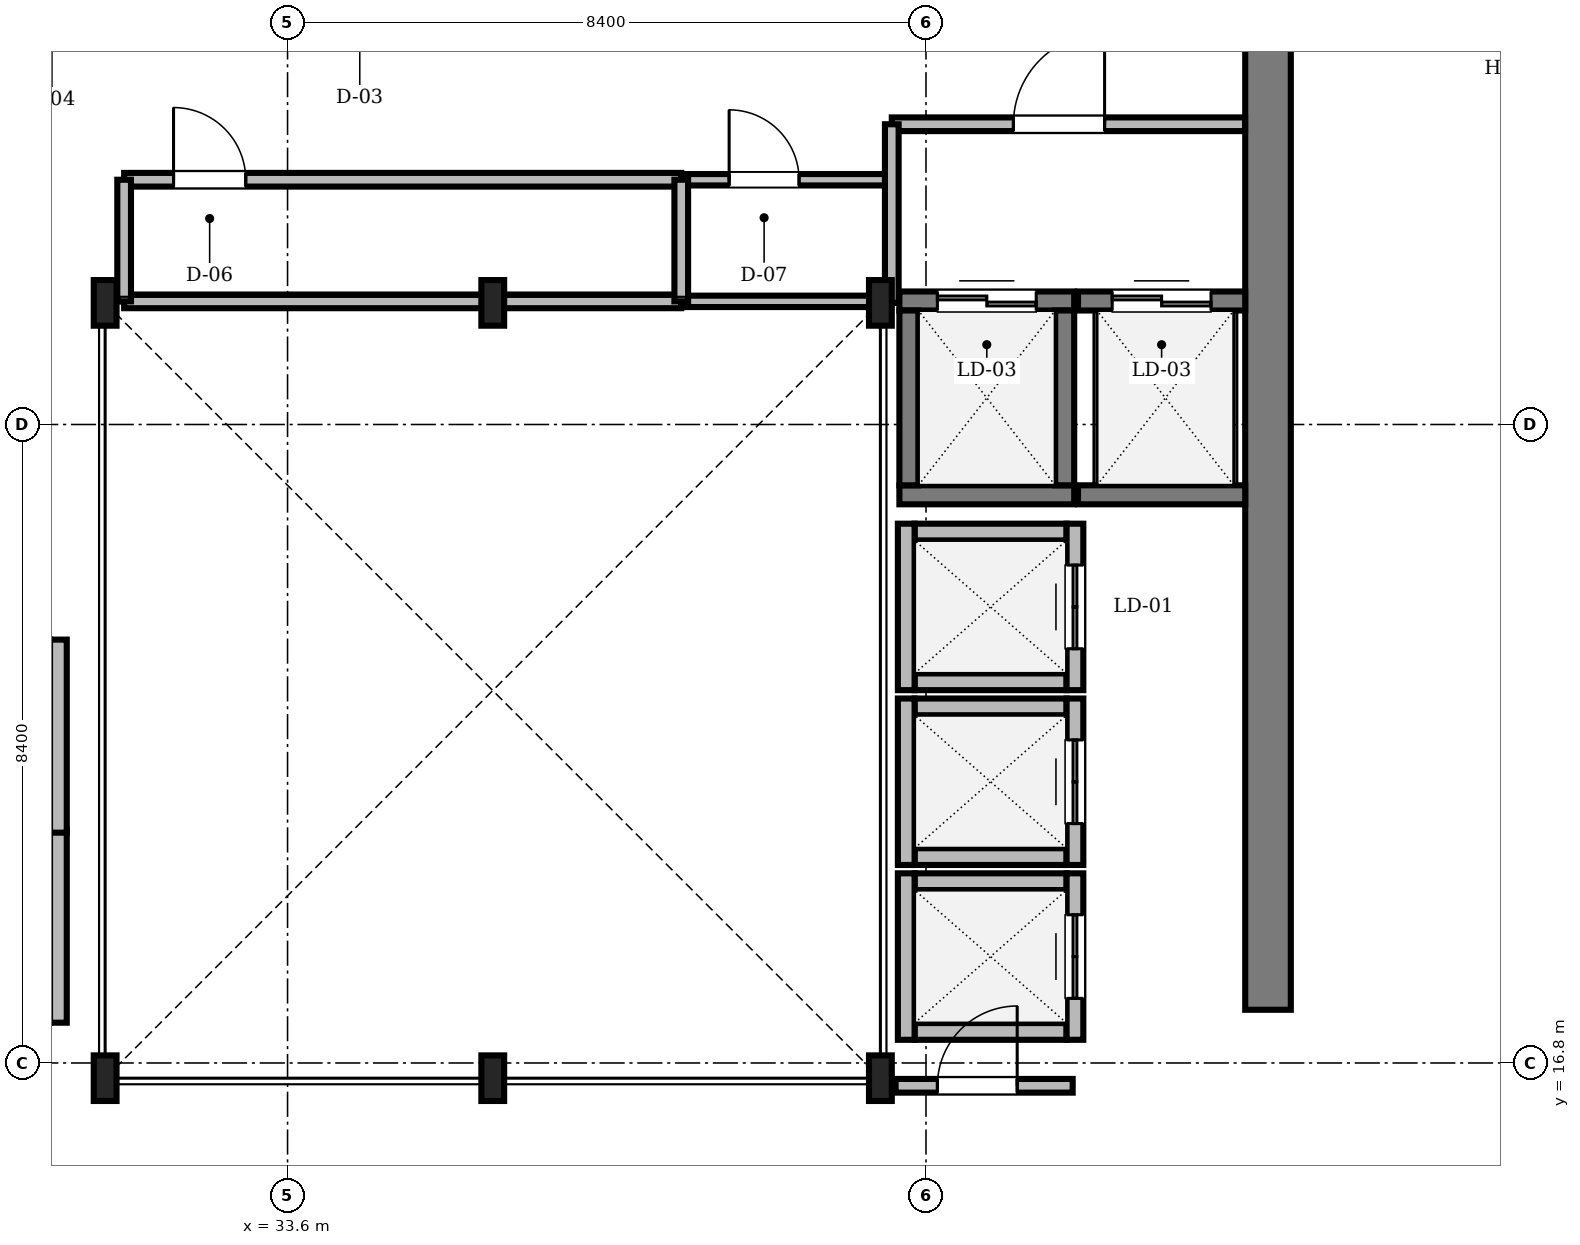
"""IFC4 building model, lengths in metres.
Left out: names, types, materials, properties, quantities, classifications, styles, units other than length and angle.
Written with IfcOpenShell. Run it as: python <this file> out.ifc"""

import sys

from ifc_helpers import new_model, si_unit, direction, frame, frame_2d, origin, origin_2d, place, context, subcontext, project, spatial, rectangle, i_section, extrude, source, transform, mapped, element, fill, save


model = new_model("IFC4")
c1 = context("Model", 3, precision=1e-05, world=origin(), true_north=direction((0.0, 1.0)))
c2 = subcontext(c1, "Body", "Model", "MODEL_VIEW")
j1 = project(units=[si_unit("LENGTHUNIT", "METRE"), si_unit("PLANEANGLEUNIT", "RADIAN")], contexts=[c1])
p1 = place(None, origin())
s1 = spatial("IfcSite", under=j1, at=p1, CompositionType="ELEMENT")
p2 = place(p1, origin())
s2 = spatial("IfcBuilding", under=s1, at=p2, CompositionType="ELEMENT")
p3 = place(p2, frame((0.0, 0.0, 270.35)))
s3 = spatial("IfcBuildingStorey", under=s2, at=p3, CompositionType="ELEMENT", Elevation=270.35)
m1 = source(origin(), c2, "Body", "SweptSolid", [
    extrude(rectangle(XDim=13.15, YDim=0.6, at=frame_2d((6.575, 0.0))), origin(), (0.0, 0.0, 1.0), 3.65),
])
p4 = place(p3, frame((46.5, 17.5, 0.0), z_axis=(0.0, 0.0, 1.0), x_axis=(0.0, 1.0, 0.0)))
e1 = element("IfcWall", 1, at=p4, inside=s3, PredefinedType="SHEAR", context=c2, shape_type="MappedRepresentation", body=[
    mapped(m1, transform((0.0, 0.0, 0.0), scale=1.0)),
])
m2 = source(origin(), c2, "Body", "SweptSolid", [
    extrude(i_section(OverallWidth=0.3, OverallDepth=0.6, WebThickness=0.015, FlangeThickness=0.03, FilletRadius=0.027, at=origin_2d()), origin(), (0.0, 0.0, 1.0), 3.65),
])
for number, where, z_axis, x_axis in (
    (2, (31.2, 16.6, 0.0), (0.0, 0.0, 1.0), (1.0, 0.0, 0.0)),
    (3, (36.3, 16.6, 0.0), (0.0, 0.0, 1.0), (1.0, 0.0, 0.0)),
    (4, (41.4, 16.6, 0.0), (0.0, 0.0, 1.0), (1.0, 0.0, 0.0)),
    (5, (41.4, 26.8, 0.0), (0.0, 0.0, 1.0), (1.0, 0.0, 0.0)),
    (6, (36.3, 26.8, 0.0), (0.0, 0.0, 1.0), (1.0, 0.0, 0.0)),
    (7, (31.2, 26.8, 0.0), (0.0, 0.0, 1.0), (1.0, 0.0, 0.0)),
):
    element("IfcColumn", number, at=place(p3, frame(where, z_axis=z_axis, x_axis=x_axis)), inside=s3, PredefinedType="COLUMN", context=c2, shape_type="MappedRepresentation", body=[
        mapped(m2, transform((0.0, 0.0, 0.0), scale=1.0)),
    ])
m3 = source(origin(), c2, "Body", "SweptSolid", [
    extrude(rectangle(XDim=2.0, YDim=0.22, at=frame_2d((1.0, 0.0))), origin(), (0.0, 0.0, 1.0), 3.65),
])
for number, where, z_axis, x_axis in (
    (8, (41.85, 21.815, 0.0), (0.0, 0.0, 1.0), (1.0, 0.0, 0.0)),
    (9, (41.85, 23.785, 0.0), (0.0, 0.0, 1.0), (1.0, 0.0, 0.0)),
):
    element("IfcWall", number, at=place(p3, frame(where, z_axis=z_axis, x_axis=x_axis)), inside=s3, PredefinedType="SOLIDWALL", context=c2, shape_type="MappedRepresentation", body=[
        mapped(m3, transform((0.0, 0.0, 0.0), scale=1.0)),
    ])
m4 = source(origin(), c2, "Body", "SweptSolid", [
    extrude(rectangle(XDim=2.19, YDim=0.22, at=frame_2d((1.095, 0.0))), origin(), (0.0, 0.0, 1.0), 3.65),
])
p5 = place(p3, frame((41.74, 21.705, 0.0), z_axis=(0.0, 0.0, 1.0), x_axis=(0.0, 1.0, 0.0)))
e10 = element("IfcWall", 10, at=p5, inside=s3, PredefinedType="SOLIDWALL", context=c2, shape_type="MappedRepresentation", body=[
    mapped(m4, transform((0.0, 0.0, 0.0), scale=1.0)),
])
p6 = place(p3, frame((43.96, 21.705, 0.0), z_axis=(0.0, 0.0, 1.0), x_axis=(0.0, 1.0, 0.0)))
e11 = element("IfcWall", 11, at=p6, inside=s3, PredefinedType="SOLIDWALL", context=c2, shape_type="MappedRepresentation", body=[
    mapped(m4, transform((0.0, 0.0, 0.0), scale=1.0)),
])
m5 = source(origin(), c2, "Body", "SweptSolid", [
    extrude(rectangle(XDim=1.1, YDim=2.2, at=frame_2d((0.55, 1.1))), frame((0.0, 0.12, 0.0), z_axis=(0.0, -1.0, 0.0), x_axis=(1.0, 0.0, 0.0)), (0.0, 0.0, 1.0), 0.24),
])
p7 = place(p6, frame((0.545, 0.0, 0.0)))
e12 = element("IfcOpeningElement", 12, at=p7, cuts=e11, PredefinedType="OPENING", context=c2, shape_type="MappedRepresentation", body=[
    mapped(m5, transform((0.0, 0.0, 0.0), scale=1.0)),
])
for number, where, z_axis, x_axis in (
    (13, (41.85, 19.515, 0.0), (0.0, 0.0, 1.0), (1.0, 0.0, 0.0)),
    (14, (41.85, 21.485, 0.0), (0.0, 0.0, 1.0), (1.0, 0.0, 0.0)),
):
    element("IfcWall", number, at=place(p3, frame(where, z_axis=z_axis, x_axis=x_axis)), inside=s3, PredefinedType="SOLIDWALL", context=c2, shape_type="MappedRepresentation", body=[
        mapped(m3, transform((0.0, 0.0, 0.0), scale=1.0)),
    ])
p8 = place(p3, frame((41.74, 19.405, 0.0), z_axis=(0.0, 0.0, 1.0), x_axis=(0.0, 1.0, 0.0)))
e15 = element("IfcWall", 15, at=p8, inside=s3, PredefinedType="SOLIDWALL", context=c2, shape_type="MappedRepresentation", body=[
    mapped(m4, transform((0.0, 0.0, 0.0), scale=1.0)),
])
p9 = place(p3, frame((43.96, 19.405, 0.0), z_axis=(0.0, 0.0, 1.0), x_axis=(0.0, 1.0, 0.0)))
e16 = element("IfcWall", 16, at=p9, inside=s3, PredefinedType="SOLIDWALL", context=c2, shape_type="MappedRepresentation", body=[
    mapped(m4, transform((0.0, 0.0, 0.0), scale=1.0)),
])
p10 = place(p9, frame((0.545, 0.0, 0.0)))
e17 = element("IfcOpeningElement", 17, at=p10, cuts=e16, PredefinedType="OPENING", context=c2, shape_type="MappedRepresentation", body=[
    mapped(m5, transform((0.0, 0.0, 0.0), scale=1.0)),
])
for number, where, z_axis, x_axis in (
    (18, (41.85, 17.215, 0.0), (0.0, 0.0, 1.0), (1.0, 0.0, 0.0)),
    (19, (41.85, 19.185, 0.0), (0.0, 0.0, 1.0), (1.0, 0.0, 0.0)),
):
    element("IfcWall", number, at=place(p3, frame(where, z_axis=z_axis, x_axis=x_axis)), inside=s3, PredefinedType="SOLIDWALL", context=c2, shape_type="MappedRepresentation", body=[
        mapped(m3, transform((0.0, 0.0, 0.0), scale=1.0)),
    ])
p11 = place(p3, frame((41.74, 17.105, 0.0), z_axis=(0.0, 0.0, 1.0), x_axis=(0.0, 1.0, 0.0)))
e20 = element("IfcWall", 20, at=p11, inside=s3, PredefinedType="SOLIDWALL", context=c2, shape_type="MappedRepresentation", body=[
    mapped(m4, transform((0.0, 0.0, 0.0), scale=1.0)),
])
p12 = place(p3, frame((43.96, 17.105, 0.0), z_axis=(0.0, 0.0, 1.0), x_axis=(0.0, 1.0, 0.0)))
e21 = element("IfcWall", 21, at=p12, inside=s3, PredefinedType="SOLIDWALL", context=c2, shape_type="MappedRepresentation", body=[
    mapped(m4, transform((0.0, 0.0, 0.0), scale=1.0)),
])
p13 = place(p12, frame((0.545, 0.0, 0.0)))
e22 = element("IfcOpeningElement", 22, at=p13, cuts=e21, PredefinedType="OPENING", context=c2, shape_type="MappedRepresentation", body=[
    mapped(m5, transform((0.0, 0.0, 0.0), scale=1.0)),
])
m6 = source(origin(), c2, "Body", "SweptSolid", [
    extrude(rectangle(XDim=2.54, YDim=0.22, at=frame_2d((1.27, 0.0))), origin(), (0.0, 0.0, 1.0), 3.65),
])
for number, where, z_axis, x_axis in (
    (23, (30.585, 17.33, 0.0), (0.0, 0.0, 1.0), (0.0, 1.0, 0.0)),
    (24, (30.585, 19.83, 0.0), (0.0, 0.0, 1.0), (0.0, 1.0, 0.0)),
):
    element("IfcWall", number, at=place(p3, frame(where, z_axis=z_axis, x_axis=x_axis)), inside=s3, PredefinedType="SOLIDWALL", context=c2, shape_type="MappedRepresentation", body=[
        mapped(m6, transform((0.0, 0.0, 0.0), scale=1.0)),
    ])
m7 = source(origin(), c2, "Body", "SweptSolid", [
    extrude(rectangle(XDim=2.3, YDim=0.25, at=frame_2d((1.15, 0.0))), origin(), (0.0, 0.0, 1.0), 3.65),
])
p14 = place(p3, frame((41.65, 24.275, 0.0), z_axis=(0.0, 0.0, 1.0), x_axis=(1.0, 0.0, 0.0)))
e25 = element("IfcWall", 25, at=p14, inside=s3, PredefinedType="SOLIDWALL", context=c2, shape_type="MappedRepresentation", body=[
    mapped(m7, transform((0.0, 0.0, 0.0), scale=1.0)),
])
p15 = place(p3, frame((41.65, 26.825, 0.0), z_axis=(0.0, 0.0, 1.0), x_axis=(1.0, 0.0, 0.0)))
e26 = element("IfcWall", 26, at=p15, inside=s3, PredefinedType="SOLIDWALL", context=c2, shape_type="MappedRepresentation", body=[
    mapped(m7, transform((0.0, 0.0, 0.0), scale=1.0)),
])
m8 = source(origin(), c2, "Body", "SweptSolid", [
    extrude(rectangle(XDim=1.3, YDim=2.3, at=frame_2d((0.65, 1.15))), frame((0.0, 0.135, 0.0), z_axis=(0.0, -1.0, 0.0), x_axis=(1.0, 0.0, 0.0)), (0.0, 0.0, 1.0), 0.27),
])
p16 = place(p15, frame((0.5, 0.0, 0.0)))
e27 = element("IfcOpeningElement", 27, at=p16, cuts=e26, PredefinedType="OPENING", context=c2, shape_type="MappedRepresentation", body=[
    mapped(m8, transform((0.0, 0.0, 0.0), scale=1.0)),
])
for number, where, z_axis, x_axis in (
    (28, (41.775, 24.4, 0.0), (0.0, 0.0, 1.0), (0.0, 1.0, 0.0)),
    (29, (43.825, 24.4, 0.0), (0.0, 0.0, 1.0), (0.0, 1.0, 0.0)),
):
    element("IfcWall", number, at=place(p3, frame(where, z_axis=z_axis, x_axis=x_axis)), inside=s3, PredefinedType="SOLIDWALL", context=c2, shape_type="MappedRepresentation", body=[
        mapped(m7, transform((0.0, 0.0, 0.0), scale=1.0)),
    ])
m9 = source(origin(), c2, "Body", "SweptSolid", [
    extrude(rectangle(XDim=2.2, YDim=0.25, at=frame_2d((1.1, 0.0))), origin(), (0.0, 0.0, 1.0), 3.65),
])
p17 = place(p3, frame((44.0, 24.275, 0.0), z_axis=(0.0, 0.0, 1.0), x_axis=(1.0, 0.0, 0.0)))
e30 = element("IfcWall", 30, at=p17, inside=s3, PredefinedType="SOLIDWALL", context=c2, shape_type="MappedRepresentation", body=[
    mapped(m9, transform((0.0, 0.0, 0.0), scale=1.0)),
])
p18 = place(p3, frame((44.0, 26.825, 0.0), z_axis=(0.0, 0.0, 1.0), x_axis=(1.0, 0.0, 0.0)))
e31 = element("IfcWall", 31, at=p18, inside=s3, PredefinedType="SOLIDWALL", context=c2, shape_type="MappedRepresentation", body=[
    mapped(m9, transform((0.0, 0.0, 0.0), scale=1.0)),
])
p19 = place(p18, frame((0.45, 0.0, 0.0)))
e32 = element("IfcOpeningElement", 32, at=p19, cuts=e31, PredefinedType="OPENING", context=c2, shape_type="MappedRepresentation", body=[
    mapped(m8, transform((0.0, 0.0, 0.0), scale=1.0)),
])
m10 = source(origin(), c2, "Body", "SweptSolid", [
    extrude(rectangle(XDim=7.33, YDim=0.18, at=frame_2d((3.665, 0.0))), origin(), (0.0, 0.0, 1.0), 3.282),
])
p20 = place(p3, frame((31.45, 28.42, 0.0), z_axis=(0.0, 0.0, 1.0), x_axis=(1.0, 0.0, 0.0)))
e33 = element("IfcWall", 33, at=p20, inside=s3, PredefinedType="PARTITIONING", context=c2, shape_type="MappedRepresentation", body=[
    mapped(m10, transform((0.0, 0.0, 0.0), scale=1.0)),
])
m11 = source(origin(), c2, "Body", "SweptSolid", [
    extrude(rectangle(XDim=0.95, YDim=2.15, at=frame_2d((0.475, 1.075))), frame((0.0, 0.1, 0.0), z_axis=(0.0, -1.0, 0.0), x_axis=(1.0, 0.0, 0.0)), (0.0, 0.0, 1.0), 0.2),
])
p21 = place(p20, frame((0.65, 0.0, 0.0)))
e34 = element("IfcOpeningElement", 34, at=p21, cuts=e33, PredefinedType="OPENING", context=c2, shape_type="MappedRepresentation", body=[
    mapped(m11, transform((0.0, 0.0, 0.0), scale=1.0)),
])
m12 = source(origin(), c2, "Body", "SweptSolid", [
    extrude(rectangle(XDim=4.648, YDim=0.18, at=frame_2d((2.324, 0.0))), origin(), (0.0, 0.0, 1.0), 3.282),
])
p22 = place(p3, frame((41.55, 29.15, 0.0), z_axis=(0.0, 0.0, 1.0), x_axis=(1.0, 0.0, 0.0)))
e35 = element("IfcWall", 35, at=p22, inside=s3, PredefinedType="PARTITIONING", context=c2, shape_type="MappedRepresentation", body=[
    mapped(m12, transform((0.0, 0.0, 0.0), scale=1.0)),
])
m13 = source(origin(), c2, "Body", "SweptSolid", [
    extrude(rectangle(XDim=1.2, YDim=2.2, at=frame_2d((0.6, 1.1))), frame((0.0, 0.1, 0.0), z_axis=(0.0, -1.0, 0.0), x_axis=(1.0, 0.0, 0.0)), (0.0, 0.0, 1.0), 0.2),
])
p23 = place(p22, frame((1.6, 0.0, 0.0)))
e36 = element("IfcOpeningElement", 36, at=p23, cuts=e35, PredefinedType="OPENING", context=c2, shape_type="MappedRepresentation", body=[
    mapped(m13, transform((0.0, 0.0, 0.0), scale=1.0)),
])
m14 = source(origin(), c2, "Body", "SweptSolid", [
    extrude(rectangle(XDim=2.74, YDim=0.15, at=frame_2d((1.37, 0.0))), origin(), (0.0, 0.0, 1.0), 3.65),
])
p24 = place(p3, frame((38.78, 28.42, 0.0), z_axis=(0.0, 0.0, 1.0), x_axis=(1.0, 0.0, 0.0)))
e37 = element("IfcWall", 37, at=p24, inside=s3, PredefinedType="PARTITIONING", context=c2, shape_type="MappedRepresentation", body=[
    mapped(m14, transform((0.0, 0.0, 0.0), scale=1.0)),
])
m15 = source(origin(), c2, "Body", "SweptSolid", [
    extrude(rectangle(XDim=0.92, YDim=2.1, at=frame_2d((0.46, 1.05))), frame((0.0, 0.085, 0.0), z_axis=(0.0, -1.0, 0.0), x_axis=(1.0, 0.0, 0.0)), (0.0, 0.0, 1.0), 0.17),
])
p25 = place(p24, frame((0.63, 0.0, 0.0)))
e38 = element("IfcOpeningElement", 38, at=p25, cuts=e37, PredefinedType="OPENING", context=c2, shape_type="MappedRepresentation", body=[
    mapped(m15, transform((0.0, 0.0, 0.0), scale=1.0)),
])
m16 = source(origin(), c2, "Body", "SweptSolid", [
    extrude(rectangle(XDim=2.33, YDim=0.18, at=frame_2d((1.165, 0.0))), origin(), (0.0, 0.0, 1.0), 3.092),
])
p26 = place(p3, frame((41.6, 16.5, 0.0), z_axis=(0.0, 0.0, 1.0), x_axis=(1.0, 0.0, 0.0)))
e39 = element("IfcWall", 39, at=p26, inside=s3, PredefinedType="PARTITIONING", context=c2, shape_type="MappedRepresentation", body=[
    mapped(m16, transform((0.0, 0.0, 0.0), scale=1.0)),
])
m17 = source(origin(), c2, "Body", "SweptSolid", [
    extrude(rectangle(XDim=1.05, YDim=2.2, at=frame_2d((0.525, 1.1))), frame((0.0, 0.1, 0.0), z_axis=(0.0, -1.0, 0.0), x_axis=(1.0, 0.0, 0.0)), (0.0, 0.0, 1.0), 0.2),
])
p27 = place(p26, frame((0.55, 0.0, 0.0)))
e40 = element("IfcOpeningElement", 40, at=p27, cuts=e39, PredefinedType="OPENING", context=c2, shape_type="MappedRepresentation", body=[
    mapped(m17, transform((0.0, 0.0, 0.0), scale=1.0)),
])
m18 = source(origin(), c2, "Body", "SweptSolid", [
    extrude(rectangle(XDim=7.33, YDim=0.18, at=frame_2d((3.665, 0.0))), origin(), (0.0, 0.0, 1.0), 3.192),
])
p28 = place(p3, frame((31.45, 26.82, 0.0), z_axis=(0.0, 0.0, 1.0), x_axis=(1.0, 0.0, 0.0)))
e41 = element("IfcWall", 41, at=p28, inside=s3, PredefinedType="PARTITIONING", context=c2, shape_type="MappedRepresentation", body=[
    mapped(m18, transform((0.0, 0.0, 0.0), scale=1.0)),
])
m19 = source(origin(), c2, "Body", "SweptSolid", [
    extrude(rectangle(XDim=2.74, YDim=0.15, at=frame_2d((1.37, 0.0))), origin(), (0.0, 0.0, 1.0), 3.192),
])
p29 = place(p3, frame((38.78, 26.82, 0.0), z_axis=(0.0, 0.0, 1.0), x_axis=(1.0, 0.0, 0.0)))
e42 = element("IfcWall", 42, at=p29, inside=s3, PredefinedType="PARTITIONING", context=c2, shape_type="MappedRepresentation", body=[
    mapped(m19, transform((0.0, 0.0, 0.0), scale=1.0)),
])
m20 = source(origin(), c2, "Body", "SweptSolid", [
    extrude(rectangle(XDim=2.35, YDim=0.18, at=frame_2d((1.175, 0.0))), origin(), (0.0, 0.0, 1.0), 3.282),
])
p30 = place(p3, frame((41.55, 26.8, 0.0), z_axis=(0.0, 0.0, 1.0), x_axis=(0.0, 1.0, 0.0)))
e43 = element("IfcWall", 43, at=p30, inside=s3, PredefinedType="PARTITIONING", context=c2, shape_type="MappedRepresentation", body=[
    mapped(m20, transform((0.0, 0.0, 0.0), scale=1.0)),
])
m21 = source(origin(), c2, "Body", "SweptSolid", [
    extrude(rectangle(XDim=1.6, YDim=0.18, at=frame_2d((0.8, 0.0))), origin(), (0.0, 0.0, 1.0), 3.192),
])
for number, where, z_axis, x_axis in (
    (44, (31.45, 26.82, 0.0), (0.0, 0.0, 1.0), (0.0, 1.0, 0.0)),
    (45, (38.78, 26.82, 0.0), (0.0, 0.0, 1.0), (0.0, 1.0, 0.0)),
):
    element("IfcWall", number, at=place(p3, frame(where, z_axis=z_axis, x_axis=x_axis)), inside=s3, PredefinedType="PARTITIONING", context=c2, shape_type="MappedRepresentation", body=[
        mapped(m21, transform((0.0, 0.0, 0.0), scale=1.0)),
    ])
m22 = source(origin(), c2, "Body", "SweptSolid", [
    extrude(rectangle(XDim=1.1, YDim=2.2, at=frame_2d((0.55, 1.1))), frame((0.0, 0.025, 0.0), z_axis=(0.0, -1.0, 0.0), x_axis=(1.0, 0.0, 0.0)), (0.0, 0.0, 1.0), 0.05),
])
p31 = place(p7, origin())
e46 = element("IfcDoor", 46, at=p31, inside=s3, OperationType="DOUBLE_DOOR_SLIDING", PredefinedType="DOOR", context=c2, shape_type="MappedRepresentation", body=[
    mapped(m22, transform((0.0, 0.0, 0.0), scale=1.0)),
])
fill(e12, e46)
p32 = place(p10, origin())
e47 = element("IfcDoor", 47, at=p32, inside=s3, OperationType="DOUBLE_DOOR_SLIDING", PredefinedType="DOOR", context=c2, shape_type="MappedRepresentation", body=[
    mapped(m22, transform((0.0, 0.0, 0.0), scale=1.0)),
])
fill(e17, e47)
p33 = place(p13, origin())
e48 = element("IfcDoor", 48, at=p33, inside=s3, OperationType="DOUBLE_DOOR_SLIDING", PredefinedType="DOOR", context=c2, shape_type="MappedRepresentation", body=[
    mapped(m22, transform((0.0, 0.0, 0.0), scale=1.0)),
])
fill(e22, e48)
m23 = source(origin(), c2, "Body", "SweptSolid", [
    extrude(rectangle(XDim=1.3, YDim=2.3, at=frame_2d((0.65, 1.15))), frame((0.0, 0.025, 0.0), z_axis=(0.0, -1.0, 0.0), x_axis=(1.0, 0.0, 0.0)), (0.0, 0.0, 1.0), 0.05),
])
p34 = place(p16, origin())
e49 = element("IfcDoor", 49, at=p34, inside=s3, OperationType="DOUBLE_DOOR_SLIDING", PredefinedType="DOOR", context=c2, shape_type="MappedRepresentation", body=[
    mapped(m23, transform((0.0, 0.0, 0.0), scale=1.0)),
])
fill(e27, e49)
p35 = place(p19, origin())
e50 = element("IfcDoor", 50, at=p35, inside=s3, OperationType="DOUBLE_DOOR_SLIDING", PredefinedType="DOOR", context=c2, shape_type="MappedRepresentation", body=[
    mapped(m23, transform((0.0, 0.0, 0.0), scale=1.0)),
])
fill(e32, e50)
m24 = source(origin(), c2, "Body", "SweptSolid", [
    extrude(rectangle(XDim=0.95, YDim=2.15, at=frame_2d((0.475, 1.075))), frame((0.0, 0.025, 0.0), z_axis=(0.0, -1.0, 0.0), x_axis=(1.0, 0.0, 0.0)), (0.0, 0.0, 1.0), 0.05),
])
p36 = place(p21, origin())
e51 = element("IfcDoor", 51, at=p36, inside=s3, OperationType="SINGLE_SWING_LEFT", PredefinedType="DOOR", context=c2, shape_type="MappedRepresentation", body=[
    mapped(m24, transform((0.0, 0.0, 0.0), scale=1.0)),
])
fill(e34, e51)
m25 = source(origin(), c2, "Body", "SweptSolid", [
    extrude(rectangle(XDim=1.2, YDim=2.2, at=frame_2d((0.6, 1.1))), frame((0.0, 0.025, 0.0), z_axis=(0.0, -1.0, 0.0), x_axis=(1.0, 0.0, 0.0)), (0.0, 0.0, 1.0), 0.05),
])
p37 = place(p23, origin())
e52 = element("IfcDoor", 52, at=p37, inside=s3, OperationType="SINGLE_SWING_RIGHT", PredefinedType="DOOR", context=c2, shape_type="MappedRepresentation", body=[
    mapped(m25, transform((0.0, 0.0, 0.0), scale=1.0)),
])
fill(e36, e52)
m26 = source(origin(), c2, "Body", "SweptSolid", [
    extrude(rectangle(XDim=0.92, YDim=2.1, at=frame_2d((0.46, 1.05))), frame((0.0, 0.025, 0.0), z_axis=(0.0, -1.0, 0.0), x_axis=(1.0, 0.0, 0.0)), (0.0, 0.0, 1.0), 0.05),
])
p38 = place(p25, origin())
e53 = element("IfcDoor", 53, at=p38, inside=s3, OperationType="SINGLE_SWING_LEFT", PredefinedType="DOOR", context=c2, shape_type="MappedRepresentation", body=[
    mapped(m26, transform((0.0, 0.0, 0.0), scale=1.0)),
])
fill(e38, e53)
m27 = source(origin(), c2, "Body", "SweptSolid", [
    extrude(rectangle(XDim=1.05, YDim=2.2, at=frame_2d((0.525, 1.1))), frame((0.0, 0.025, 0.0), z_axis=(0.0, -1.0, 0.0), x_axis=(1.0, 0.0, 0.0)), (0.0, 0.0, 1.0), 0.05),
])
p39 = place(p27, origin())
e54 = element("IfcDoor", 54, at=p39, inside=s3, OperationType="SINGLE_SWING_RIGHT", PredefinedType="DOOR", context=c2, shape_type="MappedRepresentation", body=[
    mapped(m27, transform((0.0, 0.0, 0.0), scale=1.0)),
])
fill(e40, e54)
save(model, sys.argv[1])
